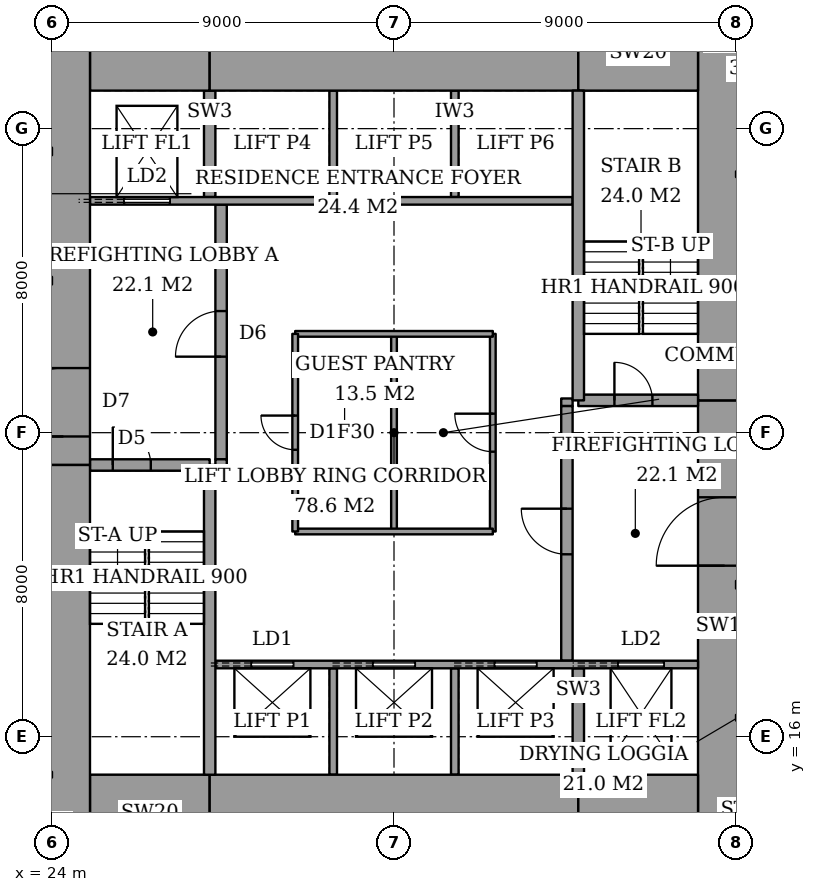
"""IFC4 building model, lengths in metres.
Left out: names, types, materials, properties, quantities, classifications, styles, units other than length and angle.
Written with IfcOpenShell. Run it as: python <this file> out.ifc"""

import sys

from ifc_helpers import new_model, si_unit, direction, frame, frame_2d, origin, place, context, subcontext, project, spatial, rectangle, extrude, element, fill, save


model = new_model("IFC4")
c1 = context("Model", 3, precision=1e-05, world=origin(), true_north=direction((0.0, 1.0)))
c2 = subcontext(c1, "Body", "Model", "MODEL_VIEW")
j1 = project(units=[si_unit("LENGTHUNIT", "METRE"), si_unit("PLANEANGLEUNIT", "RADIAN")], contexts=[c1])
p1 = place(None, origin())
s1 = spatial("IfcSite", under=j1, at=p1, CompositionType="ELEMENT")
p2 = place(p1, origin())
s2 = spatial("IfcBuilding", under=s1, at=p2, CompositionType="ELEMENT")
p3 = place(p2, frame((0.0, 0.0, 143.0)))
s3 = spatial("IfcBuildingStorey", under=s2, at=p3, CompositionType="ELEMENT", Elevation=143.0)
p4 = place(p3, frame((25.0, 14.0, 0.0), z_axis=(0.0, 0.0, 1.0), x_axis=(1.0, 0.0, 0.0)))
e1 = element("IfcWall", 1, at=p4, inside=s3, PredefinedType="SHEAR", context=c2, shape_type="SweptSolid", body=[
    extrude(rectangle(XDim=3.15, YDim=2.0, at=frame_2d((1.575, 0.0))), origin(), (0.0, 0.0, 1.0), 3.6),
])
p5 = place(p3, frame((28.15, 14.0, 0.0), z_axis=(0.0, 0.0, 1.0), x_axis=(1.0, 0.0, 0.0)))
e2 = element("IfcWall", 2, at=p5, inside=s3, PredefinedType="SHEAR", context=c2, shape_type="SweptSolid", body=[
    extrude(rectangle(XDim=9.7, YDim=2.0, at=frame_2d((4.85, 0.0))), origin(), (0.0, 0.0, 1.0), 3.6),
])
for number, where, z_axis, x_axis in (
    (3, (37.85, 14.0, 0.0), (0.0, 0.0, 1.0), (1.0, 0.0, 0.0)),
    (4, (25.0, 34.0, 0.0), (0.0, 0.0, 1.0), (1.0, 0.0, 0.0)),
):
    element("IfcWall", number, at=place(p3, frame(where, z_axis=z_axis, x_axis=x_axis)), inside=s3, PredefinedType="SHEAR", context=c2, shape_type="SweptSolid", body=[
        extrude(rectangle(XDim=3.15, YDim=2.0, at=frame_2d((1.575, 0.0))), origin(), (0.0, 0.0, 1.0), 3.6),
    ])
p6 = place(p3, frame((28.15, 34.0, 0.0), z_axis=(0.0, 0.0, 1.0), x_axis=(1.0, 0.0, 0.0)))
e5 = element("IfcWall", 5, at=p6, inside=s3, PredefinedType="SHEAR", context=c2, shape_type="SweptSolid", body=[
    extrude(rectangle(XDim=9.7, YDim=2.0, at=frame_2d((4.85, 0.0))), origin(), (0.0, 0.0, 1.0), 3.6),
])
p7 = place(p3, frame((37.85, 34.0, 0.0), z_axis=(0.0, 0.0, 1.0), x_axis=(1.0, 0.0, 0.0)))
e6 = element("IfcWall", 6, at=p7, inside=s3, PredefinedType="SHEAR", context=c2, shape_type="SweptSolid", body=[
    extrude(rectangle(XDim=3.15, YDim=2.0, at=frame_2d((1.575, 0.0))), origin(), (0.0, 0.0, 1.0), 3.6),
])
p8 = place(p3, frame((24.3, 13.0, 0.0), z_axis=(0.0, 0.0, 1.0), x_axis=(0.0, 1.0, 0.0)))
e7 = element("IfcWall", 7, at=p8, inside=s3, PredefinedType="SHEAR", context=c2, shape_type="SweptSolid", body=[
    extrude(rectangle(XDim=10.15, YDim=1.4, at=frame_2d((5.075, 0.0))), origin(), (0.0, 0.0, 1.0), 3.6),
])
p9 = place(p3, frame((24.3, 23.15, 0.0), z_axis=(0.0, 0.0, 1.0), x_axis=(0.0, 1.0, 0.0)))
e8 = element("IfcWall", 8, at=p9, inside=s3, PredefinedType="SHEAR", context=c2, shape_type="SweptSolid", body=[
    extrude(rectangle(XDim=11.85, YDim=1.4, at=frame_2d((5.925, 0.0))), origin(), (0.0, 0.0, 1.0), 3.6),
])
p10 = place(p9, frame((0.75, 0.0, 0.0)))
e9 = element("IfcOpeningElement", 9, at=p10, cuts=e8, PredefinedType="OPENING", context=c2, shape_type="SweptSolid", body=[
    extrude(rectangle(XDim=1.8, YDim=2.4, at=frame_2d((0.9, 1.2))), frame((0.0, 0.71, 0.0), z_axis=(0.0, -1.0, 0.0), x_axis=(1.0, 0.0, 0.0)), (0.0, 0.0, 1.0), 1.42),
])
p11 = place(p3, frame((41.7, 13.0, 0.0), z_axis=(0.0, 0.0, 1.0), x_axis=(0.0, 1.0, 0.0)))
e10 = element("IfcWall", 10, at=p11, inside=s3, PredefinedType="SHEAR", context=c2, shape_type="SweptSolid", body=[
    extrude(rectangle(XDim=11.85, YDim=1.4, at=frame_2d((5.925, 0.0))), origin(), (0.0, 0.0, 1.0), 3.6),
])
p12 = place(p11, frame((7.5, 0.0, 0.0)))
e11 = element("IfcOpeningElement", 11, at=p12, cuts=e10, PredefinedType="OPENING", context=c2, shape_type="SweptSolid", body=[
    extrude(rectangle(XDim=1.8, YDim=2.4, at=frame_2d((0.9, 1.2))), frame((0.0, 0.71, 0.0), z_axis=(0.0, -1.0, 0.0), x_axis=(1.0, 0.0, 0.0)), (0.0, 0.0, 1.0), 1.42),
])
p13 = place(p3, frame((41.7, 24.85, 0.0), z_axis=(0.0, 0.0, 1.0), x_axis=(0.0, 1.0, 0.0)))
e12 = element("IfcWall", 12, at=p13, inside=s3, PredefinedType="SHEAR", context=c2, shape_type="SweptSolid", body=[
    extrude(rectangle(XDim=10.15, YDim=1.4, at=frame_2d((5.075, 0.0))), origin(), (0.0, 0.0, 1.0), 3.6),
])
p14 = place(p3, frame((28.15, 15.0, 0.0), z_axis=(0.0, 0.0, 1.0), x_axis=(0.0, 1.0, 0.0)))
e13 = element("IfcWall", 13, at=p14, inside=s3, PredefinedType="SHEAR", context=c2, shape_type="SweptSolid", body=[
    extrude(rectangle(XDim=8.15, YDim=0.3, at=frame_2d((4.075, 0.0))), origin(), (0.0, 0.0, 1.0), 3.6),
])
p15 = place(p3, frame((25.0, 23.15, 0.0), z_axis=(0.0, 0.0, 1.0), x_axis=(1.0, 0.0, 0.0)))
e14 = element("IfcWall", 14, at=p15, inside=s3, PredefinedType="SHEAR", context=c2, shape_type="SweptSolid", body=[
    extrude(rectangle(XDim=3.15, YDim=0.3, at=frame_2d((1.575, 0.0))), origin(), (0.0, 0.0, 1.0), 3.6),
])
p16 = place(p15, frame((0.6, 0.0, 0.0)))
e15 = element("IfcOpeningElement", 15, at=p16, cuts=e14, PredefinedType="OPENING", context=c2, shape_type="SweptSolid", body=[
    extrude(rectangle(XDim=1.0, YDim=2.1, at=frame_2d((0.5, 1.05))), frame((0.0, 0.16, 0.0), z_axis=(0.0, -1.0, 0.0), x_axis=(1.0, 0.0, 0.0)), (0.0, 0.0, 1.0), 0.32),
])
p17 = place(p3, frame((37.85, 24.85, 0.0), z_axis=(0.0, 0.0, 1.0), x_axis=(0.0, 1.0, 0.0)))
e16 = element("IfcWall", 16, at=p17, inside=s3, PredefinedType="SHEAR", context=c2, shape_type="SweptSolid", body=[
    extrude(rectangle(XDim=8.15, YDim=0.3, at=frame_2d((4.075, 0.0))), origin(), (0.0, 0.0, 1.0), 3.6),
])
p18 = place(p3, frame((37.85, 24.85, 0.0), z_axis=(0.0, 0.0, 1.0), x_axis=(1.0, 0.0, 0.0)))
e17 = element("IfcWall", 17, at=p18, inside=s3, PredefinedType="SHEAR", context=c2, shape_type="SweptSolid", body=[
    extrude(rectangle(XDim=3.15, YDim=0.3, at=frame_2d((1.575, 0.0))), origin(), (0.0, 0.0, 1.0), 3.6),
])
p19 = place(p18, frame((0.95, 0.0, 0.0)))
e18 = element("IfcOpeningElement", 18, at=p19, cuts=e17, PredefinedType="OPENING", context=c2, shape_type="SweptSolid", body=[
    extrude(rectangle(XDim=1.0, YDim=2.1, at=frame_2d((0.5, 1.05))), frame((0.0, 0.16, 0.0), z_axis=(0.0, -1.0, 0.0), x_axis=(1.0, 0.0, 0.0)), (0.0, 0.0, 1.0), 0.32),
])
p20 = place(p3, frame((28.45, 23.3, 0.0), z_axis=(0.0, 0.0, 1.0), x_axis=(0.0, 1.0, 0.0)))
e19 = element("IfcWall", 19, at=p20, inside=s3, PredefinedType="PARTITIONING", context=c2, shape_type="SweptSolid", body=[
    extrude(rectangle(XDim=6.7, YDim=0.3, at=frame_2d((3.35, 0.0))), origin(), (0.0, 0.0, 1.0), 3.6),
])
p21 = place(p20, frame((2.7, 0.0, 0.0)))
e20 = element("IfcOpeningElement", 20, at=p21, cuts=e19, PredefinedType="OPENING", context=c2, shape_type="SweptSolid", body=[
    extrude(rectangle(XDim=1.2, YDim=2.1, at=frame_2d((0.6, 1.05))), frame((0.0, 0.16, 0.0), z_axis=(0.0, -1.0, 0.0), x_axis=(1.0, 0.0, 0.0)), (0.0, 0.0, 1.0), 0.32),
])
p22 = place(p3, frame((37.55, 18.0, 0.0), z_axis=(0.0, 0.0, 1.0), x_axis=(0.0, 1.0, 0.0)))
e21 = element("IfcWall", 21, at=p22, inside=s3, PredefinedType="PARTITIONING", context=c2, shape_type="SweptSolid", body=[
    extrude(rectangle(XDim=6.7, YDim=0.3, at=frame_2d((3.35, 0.0))), origin(), (0.0, 0.0, 1.0), 3.6),
])
p23 = place(p22, frame((2.8, 0.0, 0.0)))
e22 = element("IfcOpeningElement", 22, at=p23, cuts=e21, PredefinedType="OPENING", context=c2, shape_type="SweptSolid", body=[
    extrude(rectangle(XDim=1.2, YDim=2.1, at=frame_2d((0.6, 1.05))), frame((0.0, 0.16, 0.0), z_axis=(0.0, -1.0, 0.0), x_axis=(1.0, 0.0, 0.0)), (0.0, 0.0, 1.0), 0.32),
])
p24 = place(p3, frame((28.3, 17.9, 0.0), z_axis=(0.0, 0.0, 1.0), x_axis=(1.0, 0.0, 0.0)))
e23 = element("IfcWall", 23, at=p24, inside=s3, PredefinedType="PARTITIONING", context=c2, shape_type="SweptSolid", body=[
    extrude(rectangle(XDim=12.7, YDim=0.2, at=frame_2d((6.35, 0.0))), origin(), (0.0, 0.0, 1.0), 3.6),
])
p25 = place(p24, frame((0.95, 0.0, 0.0)))
e24 = element("IfcOpeningElement", 24, at=p25, cuts=e23, PredefinedType="OPENING", context=c2, shape_type="SweptSolid", body=[
    extrude(rectangle(XDim=1.1, YDim=2.1, at=frame_2d((0.55, 1.05))), frame((0.0, 0.11, 0.0), z_axis=(0.0, -1.0, 0.0), x_axis=(1.0, 0.0, 0.0)), (0.0, 0.0, 1.0), 0.22),
])
p26 = place(p24, frame((4.15, 0.0, 0.0)))
e25 = element("IfcOpeningElement", 25, at=p26, cuts=e23, PredefinedType="OPENING", context=c2, shape_type="SweptSolid", body=[
    extrude(rectangle(XDim=1.1, YDim=2.1, at=frame_2d((0.55, 1.05))), frame((0.0, 0.11, 0.0), z_axis=(0.0, -1.0, 0.0), x_axis=(1.0, 0.0, 0.0)), (0.0, 0.0, 1.0), 0.22),
])
p27 = place(p24, frame((7.35, 0.0, 0.0)))
e26 = element("IfcOpeningElement", 26, at=p27, cuts=e23, PredefinedType="OPENING", context=c2, shape_type="SweptSolid", body=[
    extrude(rectangle(XDim=1.1, YDim=2.1, at=frame_2d((0.55, 1.05))), frame((0.0, 0.11, 0.0), z_axis=(0.0, -1.0, 0.0), x_axis=(1.0, 0.0, 0.0)), (0.0, 0.0, 1.0), 0.22),
])
p28 = place(p24, frame((10.6, 0.0, 0.0)))
e27 = element("IfcOpeningElement", 27, at=p28, cuts=e23, PredefinedType="OPENING", context=c2, shape_type="SweptSolid", body=[
    extrude(rectangle(XDim=1.2, YDim=2.1, at=frame_2d((0.6, 1.05))), frame((0.0, 0.11, 0.0), z_axis=(0.0, -1.0, 0.0), x_axis=(1.0, 0.0, 0.0)), (0.0, 0.0, 1.0), 0.22),
])
p29 = place(p3, frame((25.0, 30.1, 0.0), z_axis=(0.0, 0.0, 1.0), x_axis=(1.0, 0.0, 0.0)))
e28 = element("IfcWall", 28, at=p29, inside=s3, PredefinedType="PARTITIONING", context=c2, shape_type="SweptSolid", body=[
    extrude(rectangle(XDim=12.7, YDim=0.2, at=frame_2d((6.35, 0.0))), origin(), (0.0, 0.0, 1.0), 3.6),
])
p30 = place(p29, frame((0.9, 0.0, 0.0)))
e29 = element("IfcOpeningElement", 29, at=p30, cuts=e28, PredefinedType="OPENING", context=c2, shape_type="SweptSolid", body=[
    extrude(rectangle(XDim=1.2, YDim=2.1, at=frame_2d((0.6, 1.05))), frame((0.0, 0.11, 0.0), z_axis=(0.0, -1.0, 0.0), x_axis=(1.0, 0.0, 0.0)), (0.0, 0.0, 1.0), 0.22),
])
for number, where, z_axis, x_axis in (
    (30, (31.4, 15.0, 0.0), (0.0, 0.0, 1.0), (0.0, 1.0, 0.0)),
    (31, (34.6, 15.0, 0.0), (0.0, 0.0, 1.0), (0.0, 1.0, 0.0)),
):
    element("IfcWall", number, at=place(p3, frame(where, z_axis=z_axis, x_axis=x_axis)), inside=s3, PredefinedType="PARTITIONING", context=c2, shape_type="SweptSolid", body=[
        extrude(rectangle(XDim=2.8, YDim=0.2, at=frame_2d((1.4, 0.0))), origin(), (0.0, 0.0, 1.0), 3.6),
    ])
p31 = place(p3, frame((37.85, 15.0, 0.0), z_axis=(0.0, 0.0, 1.0), x_axis=(0.0, 1.0, 0.0)))
e32 = element("IfcWall", 32, at=p31, inside=s3, PredefinedType="SHEAR", context=c2, shape_type="SweptSolid", body=[
    extrude(rectangle(XDim=2.8, YDim=0.3, at=frame_2d((1.4, 0.0))), origin(), (0.0, 0.0, 1.0), 3.6),
])
for number, where, z_axis, x_axis in (
    (33, (31.4, 30.2, 0.0), (0.0, 0.0, 1.0), (0.0, 1.0, 0.0)),
    (34, (34.6, 30.2, 0.0), (0.0, 0.0, 1.0), (0.0, 1.0, 0.0)),
):
    element("IfcWall", number, at=place(p3, frame(where, z_axis=z_axis, x_axis=x_axis)), inside=s3, PredefinedType="PARTITIONING", context=c2, shape_type="SweptSolid", body=[
        extrude(rectangle(XDim=2.8, YDim=0.2, at=frame_2d((1.4, 0.0))), origin(), (0.0, 0.0, 1.0), 3.6),
    ])
p32 = place(p3, frame((28.15, 30.2, 0.0), z_axis=(0.0, 0.0, 1.0), x_axis=(0.0, 1.0, 0.0)))
e35 = element("IfcWall", 35, at=p32, inside=s3, PredefinedType="SHEAR", context=c2, shape_type="SweptSolid", body=[
    extrude(rectangle(XDim=2.8, YDim=0.3, at=frame_2d((1.4, 0.0))), origin(), (0.0, 0.0, 1.0), 3.6),
])
for number, where, z_axis, x_axis in (
    (36, (28.3, 23.2, 0.0), (0.0, 0.0, 1.0), (1.0, 0.0, 0.0)),
    (37, (37.4, 24.8, 0.0), (0.0, 0.0, 1.0), (1.0, 0.0, 0.0)),
):
    element("IfcWall", number, at=place(p3, frame(where, z_axis=z_axis, x_axis=x_axis)), inside=s3, PredefinedType="PARTITIONING", context=c2, shape_type="SweptSolid", body=[
        extrude(rectangle(XDim=0.3, YDim=0.2, at=frame_2d((0.15, 0.0))), origin(), (0.0, 0.0, 1.0), 3.6),
    ])
for number, where, z_axis, x_axis in (
    (38, (30.4, 21.4, 0.0), (0.0, 0.0, 1.0), (1.0, 0.0, 0.0)),
    (39, (30.4, 26.6, 0.0), (0.0, 0.0, 1.0), (1.0, 0.0, 0.0)),
):
    element("IfcWall", number, at=place(p3, frame(where, z_axis=z_axis, x_axis=x_axis)), inside=s3, PredefinedType="PARTITIONING", context=c2, shape_type="SweptSolid", body=[
        extrude(rectangle(XDim=5.2, YDim=0.15, at=frame_2d((2.6, 0.0))), origin(), (0.0, 0.0, 1.0), 3.35),
    ])
p33 = place(p3, frame((30.4, 21.4, 0.0), z_axis=(0.0, 0.0, 1.0), x_axis=(0.0, 1.0, 0.0)))
e40 = element("IfcWall", 40, at=p33, inside=s3, PredefinedType="PARTITIONING", context=c2, shape_type="SweptSolid", body=[
    extrude(rectangle(XDim=5.2, YDim=0.15, at=frame_2d((2.6, 0.0))), origin(), (0.0, 0.0, 1.0), 3.35),
])
p34 = place(p33, frame((2.15, 0.0, 0.0)))
e41 = element("IfcOpeningElement", 41, at=p34, cuts=e40, PredefinedType="OPENING", context=c2, shape_type="SweptSolid", body=[
    extrude(rectangle(XDim=0.9, YDim=2.1, at=frame_2d((0.45, 1.05))), frame((0.0, 0.085, 0.0), z_axis=(0.0, -1.0, 0.0), x_axis=(1.0, 0.0, 0.0)), (0.0, 0.0, 1.0), 0.17),
])
p35 = place(p3, frame((35.6, 21.4, 0.0), z_axis=(0.0, 0.0, 1.0), x_axis=(0.0, 1.0, 0.0)))
e42 = element("IfcWall", 42, at=p35, inside=s3, PredefinedType="PARTITIONING", context=c2, shape_type="SweptSolid", body=[
    extrude(rectangle(XDim=5.2, YDim=0.15, at=frame_2d((2.6, 0.0))), origin(), (0.0, 0.0, 1.0), 3.35),
])
p36 = place(p35, frame((2.1, 0.0, 0.0)))
e43 = element("IfcOpeningElement", 43, at=p36, cuts=e42, PredefinedType="OPENING", context=c2, shape_type="SweptSolid", body=[
    extrude(rectangle(XDim=1.0, YDim=2.1, at=frame_2d((0.5, 1.05))), frame((0.0, 0.085, 0.0), z_axis=(0.0, -1.0, 0.0), x_axis=(1.0, 0.0, 0.0)), (0.0, 0.0, 1.0), 0.17),
])
p37 = place(p3, frame((33.0, 21.4, 0.0), z_axis=(0.0, 0.0, 1.0), x_axis=(0.0, 1.0, 0.0)))
e44 = element("IfcWall", 44, at=p37, inside=s3, PredefinedType="PARTITIONING", context=c2, shape_type="SweptSolid", body=[
    extrude(rectangle(XDim=5.2, YDim=0.15, at=frame_2d((2.6, 0.0))), origin(), (0.0, 0.0, 1.0), 3.35),
])
p38 = place(p16, origin())
e45 = element("IfcDoor", 45, at=p38, inside=s3, OperationType="SINGLE_SWING_RIGHT", PredefinedType="DOOR", context=c2, shape_type="SweptSolid", body=[
    extrude(rectangle(XDim=1.0, YDim=2.1, at=frame_2d((0.5, 1.05))), frame((0.0, 0.025, 0.0), z_axis=(0.0, -1.0, 0.0), x_axis=(1.0, 0.0, 0.0)), (0.0, 0.0, 1.0), 0.05),
])
fill(e15, e45)
p39 = place(p19, origin())
e46 = element("IfcDoor", 46, at=p39, inside=s3, OperationType="SINGLE_SWING_RIGHT", PredefinedType="DOOR", context=c2, shape_type="SweptSolid", body=[
    extrude(rectangle(XDim=1.0, YDim=2.1, at=frame_2d((0.5, 1.05))), frame((0.0, 0.025, 0.0), z_axis=(0.0, -1.0, 0.0), x_axis=(1.0, 0.0, 0.0)), (0.0, 0.0, 1.0), 0.05),
])
fill(e18, e46)
p40 = place(p21, origin())
e47 = element("IfcDoor", 47, at=p40, inside=s3, OperationType="SINGLE_SWING_RIGHT", PredefinedType="DOOR", context=c2, shape_type="SweptSolid", body=[
    extrude(rectangle(XDim=1.2, YDim=2.1, at=frame_2d((0.6, 1.05))), frame((0.0, 0.025, 0.0), z_axis=(0.0, -1.0, 0.0), x_axis=(1.0, 0.0, 0.0)), (0.0, 0.0, 1.0), 0.05),
])
fill(e20, e47)
p41 = place(p23, origin())
e48 = element("IfcDoor", 48, at=p41, inside=s3, OperationType="SINGLE_SWING_LEFT", PredefinedType="DOOR", context=c2, shape_type="SweptSolid", body=[
    extrude(rectangle(XDim=1.2, YDim=2.1, at=frame_2d((0.6, 1.05))), frame((0.0, 0.025, 0.0), z_axis=(0.0, -1.0, 0.0), x_axis=(1.0, 0.0, 0.0)), (0.0, 0.0, 1.0), 0.05),
])
fill(e22, e48)
p42 = place(p10, origin())
e49 = element("IfcDoor", 49, at=p42, inside=s3, OperationType="DOUBLE_DOOR_DOUBLE_SWING", PredefinedType="DOOR", context=c2, shape_type="SweptSolid", body=[
    extrude(rectangle(XDim=1.8, YDim=2.4, at=frame_2d((0.9, 1.2))), frame((0.0, 0.025, 0.0), z_axis=(0.0, -1.0, 0.0), x_axis=(1.0, 0.0, 0.0)), (0.0, 0.0, 1.0), 0.05),
])
fill(e9, e49)
p43 = place(p12, origin())
e50 = element("IfcDoor", 50, at=p43, inside=s3, OperationType="DOUBLE_DOOR_DOUBLE_SWING", PredefinedType="DOOR", context=c2, shape_type="SweptSolid", body=[
    extrude(rectangle(XDim=1.8, YDim=2.4, at=frame_2d((0.9, 1.2))), frame((0.0, 0.025, 0.0), z_axis=(0.0, -1.0, 0.0), x_axis=(1.0, 0.0, 0.0)), (0.0, 0.0, 1.0), 0.05),
])
fill(e11, e50)
p44 = place(p34, origin())
e51 = element("IfcDoor", 51, at=p44, inside=s3, OperationType="SINGLE_SWING_LEFT", PredefinedType="DOOR", context=c2, shape_type="SweptSolid", body=[
    extrude(rectangle(XDim=0.9, YDim=2.1, at=frame_2d((0.45, 1.05))), frame((0.0, 0.025, 0.0), z_axis=(0.0, -1.0, 0.0), x_axis=(1.0, 0.0, 0.0)), (0.0, 0.0, 1.0), 0.05),
])
fill(e41, e51)
p45 = place(p36, origin())
e52 = element("IfcDoor", 52, at=p45, inside=s3, OperationType="SINGLE_SWING_LEFT", PredefinedType="DOOR", context=c2, shape_type="SweptSolid", body=[
    extrude(rectangle(XDim=1.0, YDim=2.1, at=frame_2d((0.5, 1.05))), frame((0.0, 0.025, 0.0), z_axis=(0.0, -1.0, 0.0), x_axis=(1.0, 0.0, 0.0)), (0.0, 0.0, 1.0), 0.05),
])
fill(e43, e52)
p46 = place(p25, origin())
e53 = element("IfcDoor", 53, at=p46, inside=s3, OperationType="SLIDING_TO_LEFT", PredefinedType="DOOR", context=c2, shape_type="SweptSolid", body=[
    extrude(rectangle(XDim=1.1, YDim=2.1, at=frame_2d((0.55, 1.05))), frame((0.0, 0.025, 0.0), z_axis=(0.0, -1.0, 0.0), x_axis=(1.0, 0.0, 0.0)), (0.0, 0.0, 1.0), 0.05),
])
fill(e24, e53)
p47 = place(p26, origin())
e54 = element("IfcDoor", 54, at=p47, inside=s3, OperationType="SLIDING_TO_LEFT", PredefinedType="DOOR", context=c2, shape_type="SweptSolid", body=[
    extrude(rectangle(XDim=1.1, YDim=2.1, at=frame_2d((0.55, 1.05))), frame((0.0, 0.025, 0.0), z_axis=(0.0, -1.0, 0.0), x_axis=(1.0, 0.0, 0.0)), (0.0, 0.0, 1.0), 0.05),
])
fill(e25, e54)
p48 = place(p27, origin())
e55 = element("IfcDoor", 55, at=p48, inside=s3, OperationType="SLIDING_TO_LEFT", PredefinedType="DOOR", context=c2, shape_type="SweptSolid", body=[
    extrude(rectangle(XDim=1.1, YDim=2.1, at=frame_2d((0.55, 1.05))), frame((0.0, 0.025, 0.0), z_axis=(0.0, -1.0, 0.0), x_axis=(1.0, 0.0, 0.0)), (0.0, 0.0, 1.0), 0.05),
])
fill(e26, e55)
p49 = place(p30, origin())
e56 = element("IfcDoor", 56, at=p49, inside=s3, OperationType="SLIDING_TO_LEFT", PredefinedType="DOOR", context=c2, shape_type="SweptSolid", body=[
    extrude(rectangle(XDim=1.2, YDim=2.1, at=frame_2d((0.6, 1.05))), frame((0.0, 0.025, 0.0), z_axis=(0.0, -1.0, 0.0), x_axis=(1.0, 0.0, 0.0)), (0.0, 0.0, 1.0), 0.05),
])
fill(e29, e56)
p50 = place(p28, origin())
e57 = element("IfcDoor", 57, at=p50, inside=s3, OperationType="SLIDING_TO_LEFT", PredefinedType="DOOR", context=c2, shape_type="SweptSolid", body=[
    extrude(rectangle(XDim=1.2, YDim=2.1, at=frame_2d((0.6, 1.05))), frame((0.0, 0.025, 0.0), z_axis=(0.0, -1.0, 0.0), x_axis=(1.0, 0.0, 0.0)), (0.0, 0.0, 1.0), 0.05),
])
fill(e27, e57)
save(model, sys.argv[1])
